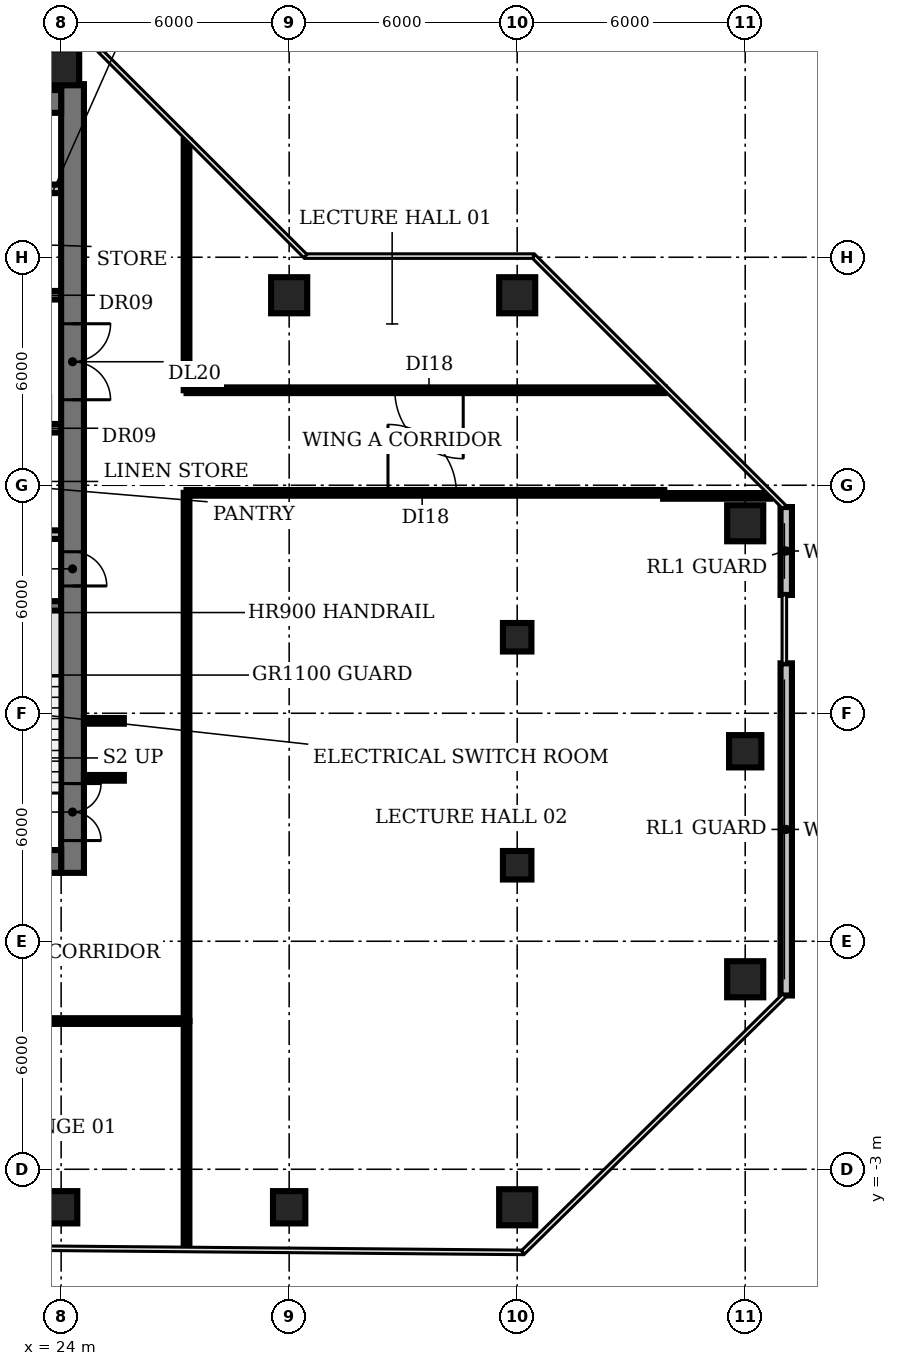
"""IFC4 building model, lengths in metres.
Left out: names, types, materials, properties, quantities, classifications, styles, units other than length and angle.
Written with IfcOpenShell. Run it as: python <this file> out.ifc"""

import sys

from ifc_helpers import new_model, si_unit, direction, frame, frame_2d, origin, origin_2d, place, context, subcontext, project, spatial, rectangle, circle, extrude, element, fill, save


model = new_model("IFC4")
c1 = context("Model", 3, precision=1e-05, world=origin(), true_north=direction((0.0, 1.0)))
c2 = subcontext(c1, "Body", "Model", "MODEL_VIEW")
j1 = project(units=[si_unit("LENGTHUNIT", "METRE"), si_unit("PLANEANGLEUNIT", "RADIAN")], contexts=[c1])
p1 = place(None, origin())
s1 = spatial("IfcSite", under=j1, at=p1, CompositionType="ELEMENT")
p2 = place(p1, origin())
s2 = spatial("IfcBuilding", under=s1, at=p2, CompositionType="ELEMENT")
p3 = place(p2, frame((0.0, 0.0, 167.6)))
s3 = spatial("IfcBuildingStorey", under=s2, at=p3, CompositionType="ELEMENT", Elevation=167.6)
p4 = place(p3, frame((24.0, -4.0, 0.0), z_axis=(0.0, 0.0, 1.0), x_axis=(1.0, 0.0, 0.0)))
e1 = element("IfcColumn", 1, at=p4, inside=s3, PredefinedType="COLUMN", context=c2, shape_type="SweptSolid", body=[
    extrude(rectangle(XDim=0.85, YDim=0.85, at=origin_2d()), origin(), (0.0, 0.0, 1.0), 3.85),
])
p5 = place(p3, frame((24.0, 26.0, 0.0), z_axis=(0.0, 0.0, 1.0), x_axis=(1.0, 0.0, 0.0)))
e2 = element("IfcColumn", 2, at=p5, inside=s3, PredefinedType="COLUMN", context=c2, shape_type="SweptSolid", body=[
    extrude(circle(Radius=0.475, at=origin_2d()), origin(), (0.0, 0.0, 1.0), 3.85),
])
p6 = place(p3, frame((30.0, -4.0, 0.0), z_axis=(0.0, 0.0, 1.0), x_axis=(1.0, 0.0, 0.0)))
e3 = element("IfcColumn", 3, at=p6, inside=s3, PredefinedType="COLUMN", context=c2, shape_type="SweptSolid", body=[
    extrude(rectangle(XDim=0.85, YDim=0.85, at=origin_2d()), origin(), (0.0, 0.0, 1.0), 3.85),
])
for number, where, z_axis, x_axis in (
    (4, (30.0, 20.0, 0.0), (0.0, 0.0, 1.0), (1.0, 0.0, 0.0)),
    (5, (36.0, -4.0, 0.0), (0.0, 0.0, 1.0), (1.0, 0.0, 0.0)),
):
    element("IfcColumn", number, at=place(p3, frame(where, z_axis=z_axis, x_axis=x_axis)), inside=s3, PredefinedType="COLUMN", context=c2, shape_type="SweptSolid", body=[
        extrude(circle(Radius=0.475, at=origin_2d()), origin(), (0.0, 0.0, 1.0), 3.85),
    ])
for number, where, z_axis, x_axis in (
    (6, (36.0, 5.0, 0.0), (0.0, 0.0, 1.0), (1.0, 0.0, 0.0)),
    (7, (36.0, 11.0, 0.0), (0.0, 0.0, 1.0), (1.0, 0.0, 0.0)),
):
    element("IfcColumn", number, at=place(p3, frame(where, z_axis=z_axis, x_axis=x_axis)), inside=s3, PredefinedType="COLUMN", context=c2, shape_type="SweptSolid", body=[
        extrude(rectangle(XDim=0.75, YDim=0.75, at=origin_2d()), origin(), (0.0, 0.0, 1.0), 3.85),
    ])
for number, where, z_axis, x_axis in (
    (8, (36.0, 20.0, 0.0), (0.0, 0.0, 1.0), (1.0, 0.0, 0.0)),
    (9, (42.0, 2.0, 0.0), (0.0, 0.0, 1.0), (1.0, 0.0, 0.0)),
):
    element("IfcColumn", number, at=place(p3, frame(where, z_axis=z_axis, x_axis=x_axis)), inside=s3, PredefinedType="COLUMN", context=c2, shape_type="SweptSolid", body=[
        extrude(circle(Radius=0.475, at=origin_2d()), origin(), (0.0, 0.0, 1.0), 3.85),
    ])
p7 = place(p3, frame((42.0, 8.0, 0.0), z_axis=(0.0, 0.0, 1.0), x_axis=(1.0, 0.0, 0.0)))
e10 = element("IfcColumn", 10, at=p7, inside=s3, PredefinedType="COLUMN", context=c2, shape_type="SweptSolid", body=[
    extrude(rectangle(XDim=0.85, YDim=0.85, at=origin_2d()), origin(), (0.0, 0.0, 1.0), 3.85),
])
p8 = place(p3, frame((42.0, 14.0, 0.0), z_axis=(0.0, 0.0, 1.0), x_axis=(1.0, 0.0, 0.0)))
e11 = element("IfcColumn", 11, at=p8, inside=s3, PredefinedType="COLUMN", context=c2, shape_type="SweptSolid", body=[
    extrude(circle(Radius=0.475, at=origin_2d()), origin(), (0.0, 0.0, 1.0), 3.85),
])
p9 = place(p3, frame((43.08, 1.573, 0.0), z_axis=(0.0, 0.0, 1.0), x_axis=(0.0, 1.0, 0.0)))
e12 = element("IfcWall", 12, at=p9, inside=s3, PredefinedType="SOLIDWALL", context=c2, shape_type="SweptSolid", body=[
    extrude(rectangle(XDim=8.74, YDim=0.3, at=frame_2d((4.37, 0.0))), origin(), (0.0, 0.0, 1.0), 3.85),
])
p10 = place(p3, frame((43.08, 12.113, 0.0), z_axis=(0.0, 0.0, 1.0), x_axis=(0.0, 1.0, 0.0)))
e13 = element("IfcWall", 13, at=p10, inside=s3, PredefinedType="SOLIDWALL", context=c2, shape_type="SweptSolid", body=[
    extrude(rectangle(XDim=2.313, YDim=0.3, at=frame_2d((1.157, 0.0))), origin(), (0.0, 0.0, 1.0), 3.85),
])
p11 = place(p3, frame((20.85, 11.825, 0.0), z_axis=(0.0, 0.0, 1.0), x_axis=(1.0, 0.0, 0.0)))
e14 = element("IfcWall", 14, at=p11, inside=s3, PredefinedType="SHEAR", context=c2, shape_type="SweptSolid", body=[
    extrude(rectangle(XDim=3.15, YDim=0.25, at=frame_2d((1.575, 0.0))), origin(), (0.0, 0.0, 1.0), 3.85),
])
p12 = place(p3, frame((16.6, 13.7, 0.0), z_axis=(0.0, 0.0, 1.0), x_axis=(1.0, 0.0, 0.0)))
e15 = element("IfcWall", 15, at=p12, inside=s3, PredefinedType="PARTITIONING", context=c2, shape_type="SweptSolid", body=[
    extrude(rectangle(XDim=7.4, YDim=0.225, at=frame_2d((3.7, 0.0))), origin(), (0.0, 0.0, 1.0), 3.85),
])
p13 = place(p3, frame((9.4, 16.5, 0.0), z_axis=(0.0, 0.0, 1.0), x_axis=(1.0, 0.0, 0.0)))
e16 = element("IfcWall", 16, at=p13, inside=s3, PredefinedType="PARTITIONING", context=c2, shape_type="SweptSolid", body=[
    extrude(rectangle(XDim=14.6, YDim=0.225, at=frame_2d((7.3, 0.0))), origin(), (0.0, 0.0, 1.0), 3.85),
])
p14 = place(p13, frame((1.6, 0.0, 0.0)))
e17 = element("IfcOpeningElement", 17, at=p14, cuts=e16, PredefinedType="OPENING", context=c2, shape_type="SweptSolid", body=[
    extrude(rectangle(XDim=1.0, YDim=2.1, at=frame_2d((0.5, 1.05))), frame((0.0, 0.123, 0.0), z_axis=(0.0, -1.0, 0.0), x_axis=(1.0, 0.0, 0.0)), (0.0, 0.0, 1.0), 0.245),
])
p15 = place(p13, frame((5.125, 0.0, 0.0)))
e18 = element("IfcOpeningElement", 18, at=p15, cuts=e16, PredefinedType="OPENING", context=c2, shape_type="SweptSolid", body=[
    extrude(rectangle(XDim=0.9, YDim=2.1, at=frame_2d((0.45, 1.05))), frame((0.0, 0.123, 0.0), z_axis=(0.0, -1.0, 0.0), x_axis=(1.0, 0.0, 0.0)), (0.0, 0.0, 1.0), 0.245),
])
p16 = place(p13, frame((7.675, 0.0, 0.0)))
e19 = element("IfcOpeningElement", 19, at=p16, cuts=e16, PredefinedType="OPENING", context=c2, shape_type="SweptSolid", body=[
    extrude(rectangle(XDim=0.9, YDim=2.1, at=frame_2d((0.45, 1.05))), frame((0.0, 0.123, 0.0), z_axis=(0.0, -1.0, 0.0), x_axis=(1.0, 0.0, 0.0)), (0.0, 0.0, 1.0), 0.245),
])
p17 = place(p13, frame((9.775, 0.0, 0.0)))
e20 = element("IfcOpeningElement", 20, at=p17, cuts=e16, PredefinedType="OPENING", context=c2, shape_type="SweptSolid", body=[
    extrude(rectangle(XDim=0.9, YDim=2.1, at=frame_2d((0.45, 1.05))), frame((0.0, 0.123, 0.0), z_axis=(0.0, -1.0, 0.0), x_axis=(1.0, 0.0, 0.0)), (0.0, 0.0, 1.0), 0.245),
])
p18 = place(p13, frame((11.647, 0.0, 0.0)))
e21 = element("IfcOpeningElement", 21, at=p18, cuts=e16, PredefinedType="OPENING", context=c2, shape_type="SweptSolid", body=[
    extrude(rectangle(XDim=0.9, YDim=2.1, at=frame_2d((0.45, 1.05))), frame((0.0, 0.123, 0.0), z_axis=(0.0, -1.0, 0.0), x_axis=(1.0, 0.0, 0.0)), (0.0, 0.0, 1.0), 0.245),
])
p19 = place(p13, frame((13.423, 0.0, 0.0)))
e22 = element("IfcOpeningElement", 22, at=p19, cuts=e16, PredefinedType="OPENING", context=c2, shape_type="SweptSolid", body=[
    extrude(rectangle(XDim=0.9, YDim=2.1, at=frame_2d((0.45, 1.05))), frame((0.0, 0.123, 0.0), z_axis=(0.0, -1.0, 0.0), x_axis=(1.0, 0.0, 0.0)), (0.0, 0.0, 1.0), 0.245),
])
p20 = place(p3, frame((24.0, 20.0, 0.0), z_axis=(0.0, 0.0, 1.0), x_axis=(-1.0, 0.0, 0.0)))
e23 = element("IfcWall", 23, at=p20, inside=s3, PredefinedType="PARTITIONING", context=c2, shape_type="SweptSolid", body=[
    extrude(rectangle(XDim=14.6, YDim=0.225, at=frame_2d((7.3, 0.0))), origin(), (0.0, 0.0, 1.0), 3.85),
])
p21 = place(p20, frame((12.75, 0.0, 0.0)))
e24 = element("IfcOpeningElement", 24, at=p21, cuts=e23, PredefinedType="OPENING", context=c2, shape_type="SweptSolid", body=[
    extrude(rectangle(XDim=1.1, YDim=2.1, at=frame_2d((0.55, 1.05))), frame((0.0, 0.123, 0.0), z_axis=(0.0, -1.0, 0.0), x_axis=(1.0, 0.0, 0.0)), (0.0, 0.0, 1.0), 0.245),
])
p22 = place(p20, frame((9.95, 0.0, 0.0)))
e25 = element("IfcOpeningElement", 25, at=p22, cuts=e23, PredefinedType="OPENING", context=c2, shape_type="SweptSolid", body=[
    extrude(rectangle(XDim=1.1, YDim=2.1, at=frame_2d((0.55, 1.05))), frame((0.0, 0.123, 0.0), z_axis=(0.0, -1.0, 0.0), x_axis=(1.0, 0.0, 0.0)), (0.0, 0.0, 1.0), 0.245),
])
p23 = place(p20, frame((7.15, 0.0, 0.0)))
e26 = element("IfcOpeningElement", 26, at=p23, cuts=e23, PredefinedType="OPENING", context=c2, shape_type="SweptSolid", body=[
    extrude(rectangle(XDim=1.1, YDim=2.1, at=frame_2d((0.55, 1.05))), frame((0.0, 0.123, 0.0), z_axis=(0.0, -1.0, 0.0), x_axis=(1.0, 0.0, 0.0)), (0.0, 0.0, 1.0), 0.245),
])
p24 = place(p20, frame((4.35, 0.0, 0.0)))
e27 = element("IfcOpeningElement", 27, at=p24, cuts=e23, PredefinedType="OPENING", context=c2, shape_type="SweptSolid", body=[
    extrude(rectangle(XDim=1.1, YDim=2.1, at=frame_2d((0.55, 1.05))), frame((0.0, 0.123, 0.0), z_axis=(0.0, -1.0, 0.0), x_axis=(1.0, 0.0, 0.0)), (0.0, 0.0, 1.0), 0.245),
])
p25 = place(p20, frame((2.137, 0.0, 0.0)))
e28 = element("IfcOpeningElement", 28, at=p25, cuts=e23, PredefinedType="OPENING", context=c2, shape_type="SweptSolid", body=[
    extrude(rectangle(XDim=0.9, YDim=2.1, at=frame_2d((0.45, 1.05))), frame((0.0, 0.123, 0.0), z_axis=(0.0, -1.0, 0.0), x_axis=(1.0, 0.0, 0.0)), (0.0, 0.0, 1.0), 0.245),
])
p26 = place(p20, frame((0.363, 0.0, 0.0)))
e29 = element("IfcOpeningElement", 29, at=p26, cuts=e23, PredefinedType="OPENING", context=c2, shape_type="SweptSolid", body=[
    extrude(rectangle(XDim=0.9, YDim=2.1, at=frame_2d((0.45, 1.05))), frame((0.0, 0.123, 0.0), z_axis=(0.0, -1.0, 0.0), x_axis=(1.0, 0.0, 0.0)), (0.0, 0.0, 1.0), 0.245),
])
p27 = place(p3, frame((9.4, 22.8, 0.0), z_axis=(0.0, 0.0, 1.0), x_axis=(1.0, 0.0, 0.0)))
e30 = element("IfcWall", 30, at=p27, inside=s3, PredefinedType="PARTITIONING", context=c2, shape_type="SweptSolid", body=[
    extrude(rectangle(XDim=14.6, YDim=0.225, at=frame_2d((7.3, 0.0))), origin(), (0.0, 0.0, 1.0), 3.85),
])
p28 = place(p3, frame((24.3, 25.555, 0.0), z_axis=(0.0, 0.0, 1.0), x_axis=(0.0, -1.0, 0.0)))
e31 = element("IfcWall", 31, at=p28, inside=s3, PredefinedType="SHEAR", context=c2, shape_type="SweptSolid", body=[
    extrude(rectangle(XDim=20.755, YDim=0.6, at=frame_2d((10.377, 0.0))), origin(), (0.0, 0.0, 1.0), 3.85),
])
p29 = place(p28, frame((18.405, 0.0, 0.0)))
e32 = element("IfcOpeningElement", 32, at=p29, cuts=e31, PredefinedType="OPENING", context=c2, shape_type="SweptSolid", body=[
    extrude(rectangle(XDim=1.5, YDim=2.1, at=frame_2d((0.75, 1.05))), frame((0.0, 0.31, 0.0), z_axis=(0.0, -1.0, 0.0), x_axis=(1.0, 0.0, 0.0)), (0.0, 0.0, 1.0), 0.62),
])
p30 = place(p28, frame((12.305, 0.0, 0.0)))
e33 = element("IfcOpeningElement", 33, at=p30, cuts=e31, PredefinedType="OPENING", context=c2, shape_type="SweptSolid", body=[
    extrude(rectangle(XDim=0.9, YDim=2.1, at=frame_2d((0.45, 1.05))), frame((0.0, 0.31, 0.0), z_axis=(0.0, -1.0, 0.0), x_axis=(1.0, 0.0, 0.0)), (0.0, 0.0, 1.0), 0.62),
])
p31 = place(p28, frame((6.305, 0.0, 0.0)))
e34 = element("IfcOpeningElement", 34, at=p31, cuts=e31, PredefinedType="OPENING", context=c2, shape_type="SweptSolid", body=[
    extrude(rectangle(XDim=2.0, YDim=2.1, at=frame_2d((1.0, 1.05))), frame((0.0, 0.31, 0.0), z_axis=(0.0, -1.0, 0.0), x_axis=(1.0, 0.0, 0.0)), (0.0, 0.0, 1.0), 0.62),
])
p32 = place(p3, frame((24.0, 5.1, 0.0), z_axis=(0.0, 0.0, 1.0), x_axis=(-1.0, 0.0, 0.0)))
e35 = element("IfcWall", 35, at=p32, inside=s3, PredefinedType="SHEAR", context=c2, shape_type="SweptSolid", body=[
    extrude(rectangle(XDim=18.0, YDim=0.6, at=frame_2d((9.0, 0.0))), origin(), (0.0, 0.0, 1.0), 3.85),
])
p33 = place(p32, frame((13.0, 0.0, 0.0)))
e36 = element("IfcOpeningElement", 36, at=p33, cuts=e35, PredefinedType="OPENING", context=c2, shape_type="SweptSolid", body=[
    extrude(rectangle(XDim=1.2, YDim=2.1, at=frame_2d((0.6, 1.05))), frame((0.0, 0.31, 0.0), z_axis=(0.0, -1.0, 0.0), x_axis=(1.0, 0.0, 0.0)), (0.0, 0.0, 1.0), 0.62),
])
p34 = place(p32, frame((4.9, 0.0, 0.0)))
e37 = element("IfcOpeningElement", 37, at=p34, cuts=e35, PredefinedType="OPENING", context=c2, shape_type="SweptSolid", body=[
    extrude(rectangle(XDim=1.0, YDim=2.1, at=frame_2d((0.5, 1.05))), frame((0.0, 0.31, 0.0), z_axis=(0.0, -1.0, 0.0), x_axis=(1.0, 0.0, 0.0)), (0.0, 0.0, 1.0), 0.62),
])
p35 = place(p3, frame((6.0, 25.1, 0.0), z_axis=(0.0, 0.0, 1.0), x_axis=(1.0, 0.0, 0.0)))
e38 = element("IfcWall", 38, at=p35, inside=s3, PredefinedType="SHEAR", context=c2, shape_type="SweptSolid", body=[
    extrude(rectangle(XDim=18.0, YDim=0.6, at=frame_2d((9.0, 0.0))), origin(), (0.0, 0.0, 1.0), 3.85),
])
for number, where, z_axis, x_axis in (
    (39, (24.6, 7.3, 0.0), (0.0, 0.0, 1.0), (1.0, 0.0, 0.0)),
    (40, (24.6, 8.8, 0.0), (0.0, 0.0, 1.0), (1.0, 0.0, 0.0)),
):
    element("IfcWall", number, at=place(p3, frame(where, z_axis=z_axis, x_axis=x_axis)), inside=s3, PredefinedType="PARTITIONING", context=c2, shape_type="SweptSolid", body=[
        extrude(rectangle(XDim=1.05, YDim=0.15, at=frame_2d((0.525, 0.0))), origin(), (0.0, 0.0, 1.0), 2.88),
    ])
p36 = place(p3, frame((27.3, -5.06, 0.0), z_axis=(0.0, 0.0, 1.0), x_axis=(0.0, 1.0, 0.0)))
e41 = element("IfcWall", 41, at=p36, inside=s3, PredefinedType="PARTITIONING", context=c2, shape_type="SweptSolid", body=[
    extrude(rectangle(XDim=5.96, YDim=0.15, at=frame_2d((2.98, 0.0))), origin(), (0.0, 0.0, 1.0), 2.88),
])
p37 = place(p3, frame((27.3, 0.9, 0.0), z_axis=(0.0, 0.0, 1.0), x_axis=(-1.0, 0.0, 0.0)))
e42 = element("IfcWall", 42, at=p37, inside=s3, PredefinedType="PARTITIONING", context=c2, shape_type="SweptSolid", body=[
    extrude(rectangle(XDim=24.6, YDim=0.15, at=frame_2d((12.3, 0.0))), origin(), (0.0, 0.0, 1.0), 2.88),
])
p38 = place(p37, frame((11.8, 0.0, 0.0)))
e43 = element("IfcOpeningElement", 43, at=p38, cuts=e42, PredefinedType="OPENING", context=c2, shape_type="SweptSolid", body=[
    extrude(rectangle(XDim=1.2, YDim=2.1, at=frame_2d((0.6, 1.05))), frame((0.0, 0.085, 0.0), z_axis=(0.0, -1.0, 0.0), x_axis=(1.0, 0.0, 0.0)), (0.0, 0.0, 1.0), 0.17),
])
p39 = place(p3, frame((27.3, 0.9, 0.0), z_axis=(0.0, 0.0, 1.0), x_axis=(0.0, 1.0, 0.0)))
e44 = element("IfcWall", 44, at=p39, inside=s3, PredefinedType="PARTITIONING", context=c2, shape_type="SweptSolid", body=[
    extrude(rectangle(XDim=13.9, YDim=0.15, at=frame_2d((6.95, 0.0))), origin(), (0.0, 0.0, 1.0), 2.88),
])
p40 = place(p3, frame((27.3, 14.8, 0.0), z_axis=(0.0, 0.0, 1.0), x_axis=(1.0, 0.0, 0.0)))
e45 = element("IfcWall", 45, at=p40, inside=s3, PredefinedType="PARTITIONING", context=c2, shape_type="SweptSolid", body=[
    extrude(rectangle(XDim=12.57, YDim=0.15, at=frame_2d((6.285, 0.0))), origin(), (0.0, 0.0, 1.0), 2.88),
])
p41 = place(p40, frame((5.3, 0.0, 0.0)))
e46 = element("IfcOpeningElement", 46, at=p41, cuts=e45, PredefinedType="OPENING", context=c2, shape_type="SweptSolid", body=[
    extrude(rectangle(XDim=1.8, YDim=2.1, at=frame_2d((0.9, 1.05))), frame((0.0, 0.085, 0.0), z_axis=(0.0, -1.0, 0.0), x_axis=(1.0, 0.0, 0.0)), (0.0, 0.0, 1.0), 0.17),
])
p42 = place(p3, frame((27.3, 17.5, 0.0), z_axis=(0.0, 0.0, 1.0), x_axis=(0.0, 1.0, 0.0)))
e47 = element("IfcWall", 47, at=p42, inside=s3, PredefinedType="PARTITIONING", context=c2, shape_type="SweptSolid", body=[
    extrude(rectangle(XDim=6.58, YDim=0.15, at=frame_2d((3.29, 0.0))), origin(), (0.0, 0.0, 1.0), 2.88),
])
p43 = place(p3, frame((39.84, 14.72, 0.0), z_axis=(0.0, 0.0, 1.0), x_axis=(1.0, 0.0, 0.0)))
e48 = element("IfcWall", 48, at=p43, inside=s3, PredefinedType="PARTITIONING", context=c2, shape_type="SweptSolid", body=[
    extrude(rectangle(XDim=2.812, YDim=0.15, at=frame_2d((1.406, 0.0))), origin(), (0.0, 0.0, 1.0), 2.88),
])
p44 = place(p3, frame((39.88, 17.5, 0.0), z_axis=(0.0, 0.0, 1.0), x_axis=(-1.0, 0.0, 0.0)))
e49 = element("IfcWall", 49, at=p44, inside=s3, PredefinedType="PARTITIONING", context=c2, shape_type="SweptSolid", body=[
    extrude(rectangle(XDim=12.58, YDim=0.15, at=frame_2d((6.29, 0.0))), origin(), (0.0, 0.0, 1.0), 2.88),
])
p45 = place(p44, frame((5.3, 0.0, 0.0)))
e50 = element("IfcOpeningElement", 50, at=p45, cuts=e49, PredefinedType="OPENING", context=c2, shape_type="SweptSolid", body=[
    extrude(rectangle(XDim=1.8, YDim=2.1, at=frame_2d((0.9, 1.05))), frame((0.0, 0.085, 0.0), z_axis=(0.0, -1.0, 0.0), x_axis=(1.0, 0.0, 0.0)), (0.0, 0.0, 1.0), 0.17),
])
p46 = place(p29, origin())
e51 = element("IfcDoor", 51, at=p46, inside=s3, OperationType="DOUBLE_DOOR_SINGLE_SWING", PredefinedType="DOOR", context=c2, shape_type="SweptSolid", body=[
    extrude(rectangle(XDim=1.5, YDim=2.1, at=frame_2d((0.75, 1.05))), frame((0.0, 0.025, 0.0), z_axis=(0.0, -1.0, 0.0), x_axis=(1.0, 0.0, 0.0)), (0.0, 0.0, 1.0), 0.05),
])
fill(e32, e51)
p47 = place(p30, origin())
e52 = element("IfcDoor", 52, at=p47, inside=s3, OperationType="SINGLE_SWING_RIGHT", PredefinedType="DOOR", context=c2, shape_type="SweptSolid", body=[
    extrude(rectangle(XDim=0.9, YDim=2.1, at=frame_2d((0.45, 1.05))), frame((0.0, -0.24, 0.0), z_axis=(0.0, -1.0, 0.0), x_axis=(1.0, 0.0, 0.0)), (0.0, 0.0, 1.0), 0.05),
])
fill(e33, e52)
p48 = place(p31, origin())
e53 = element("IfcDoor", 53, at=p48, inside=s3, OperationType="DOUBLE_DOOR_SINGLE_SWING", PredefinedType="DOOR", context=c2, shape_type="SweptSolid", body=[
    extrude(rectangle(XDim=2.0, YDim=2.1, at=frame_2d((1.0, 1.05))), frame((0.0, 0.025, 0.0), z_axis=(0.0, -1.0, 0.0), x_axis=(1.0, 0.0, 0.0)), (0.0, 0.0, 1.0), 0.05),
])
fill(e34, e53)
p49 = place(p41, origin())
e54 = element("IfcDoor", 54, at=p49, inside=s3, OperationType="SINGLE_SWING_LEFT", PredefinedType="DOOR", context=c2, shape_type="SweptSolid", body=[
    extrude(rectangle(XDim=1.8, YDim=2.1, at=frame_2d((0.9, 1.05))), frame((0.0, 0.025, 0.0), z_axis=(0.0, -1.0, 0.0), x_axis=(1.0, 0.0, 0.0)), (0.0, 0.0, 1.0), 0.05),
])
fill(e46, e54)
p50 = place(p45, origin())
e55 = element("IfcDoor", 55, at=p50, inside=s3, OperationType="SINGLE_SWING_LEFT", PredefinedType="DOOR", context=c2, shape_type="SweptSolid", body=[
    extrude(rectangle(XDim=1.8, YDim=2.1, at=frame_2d((0.9, 1.05))), frame((0.0, 0.025, 0.0), z_axis=(0.0, -1.0, 0.0), x_axis=(1.0, 0.0, 0.0)), (0.0, 0.0, 1.0), 0.05),
])
fill(e50, e55)
save(model, sys.argv[1])
